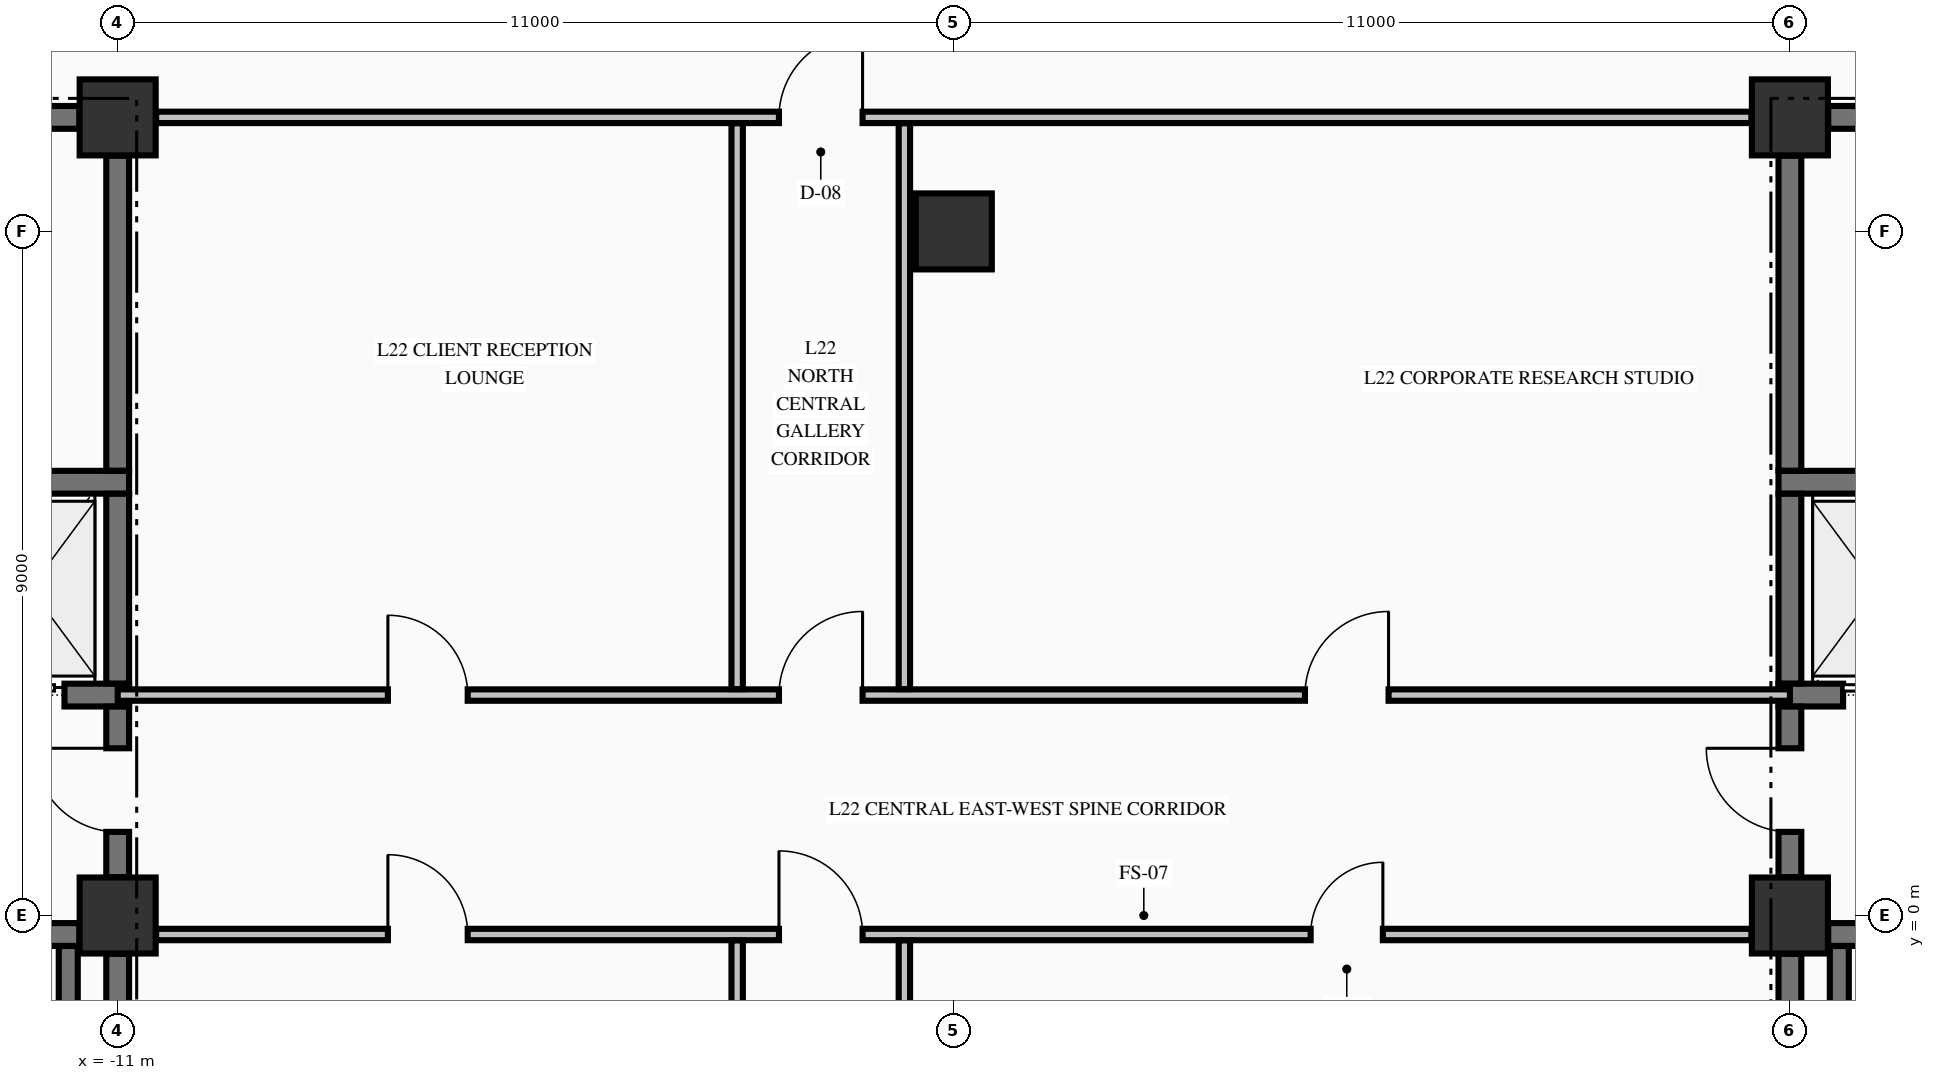
"""IFC4 building model, lengths in metres.
Left out: names, types, materials, properties, quantities, classifications, styles, units other than length and angle.
Written with IfcOpenShell. Run it as: python <this file> out.ifc"""

import sys

from ifc_helpers import new_model, si_unit, direction, frame, frame_2d, origin, origin_2d, place, context, subcontext, project, spatial, rectangle, extrude, element, fill, save


model = new_model("IFC4")
c1 = context("Model", 3, precision=1e-05, world=origin(), true_north=direction((0.0, 1.0)))
c2 = subcontext(c1, "Body", "Model", "MODEL_VIEW")
j1 = project(units=[si_unit("LENGTHUNIT", "METRE"), si_unit("PLANEANGLEUNIT", "RADIAN")], contexts=[c1])
p1 = place(None, origin())
s1 = spatial("IfcSite", under=j1, at=p1, CompositionType="ELEMENT")
p2 = place(p1, origin())
s2 = spatial("IfcBuilding", under=s1, at=p2, CompositionType="ELEMENT")
p3 = place(p2, frame((0.0, 0.0, 91.36)))
s3 = spatial("IfcBuildingStorey", under=s2, at=p3, CompositionType="ELEMENT", Elevation=91.36)
for number, where, z_axis, x_axis in (
    (1, (-11.0, 0.0, -0.25), (0.0, 0.0, 1.0), (1.0, 0.0, 0.0)),
    (2, (-11.0, 10.5, -0.25), (0.0, 0.0, 1.0), (1.0, 0.0, 0.0)),
    (3, (11.0, 0.0, -0.25), (0.0, 0.0, 1.0), (1.0, 0.0, 0.0)),
    (4, (11.0, 10.5, -0.25), (0.0, 0.0, 1.0), (1.0, 0.0, 0.0)),
    (5, (0.0, 9.0, -0.25), (0.0, 0.0, 1.0), (1.0, 0.0, 0.0)),
):
    element("IfcColumn", number, at=place(p3, frame(where, z_axis=z_axis, x_axis=x_axis)), inside=s3, PredefinedType="COLUMN", context=c2, shape_type="SweptSolid", body=[
        extrude(rectangle(XDim=1.0, YDim=1.0, at=origin_2d()), origin(), (0.0, 0.0, 1.0), 3.57),
    ])
p4 = place(p3, frame((-19.496, -0.25, 0.0), z_axis=(0.0, 0.0, 1.0), x_axis=(1.0, 0.0, 0.0)))
e6 = element("IfcWall", 6, at=p4, inside=s3, PredefinedType="SHEAR", context=c2, shape_type="SweptSolid", body=[
    extrude(rectangle(XDim=7.992, YDim=0.3, at=frame_2d((3.996, 0.0))), origin(), (0.0, 0.0, 1.0), 3.32),
])
p5 = place(p4, frame((5.796, 0.0, 0.0)))
e7 = element("IfcOpeningElement", 7, at=p5, cuts=e6, PredefinedType="OPENING", context=c2, shape_type="SweptSolid", body=[
    extrude(rectangle(XDim=1.1, YDim=2.15, at=frame_2d((0.55, 1.075))), frame((0.0, 0.16, 0.0), z_axis=(0.0, -1.0, 0.0), x_axis=(1.0, 0.0, 0.0)), (0.0, 0.0, 1.0), 0.32),
])
p6 = place(p3, frame((11.504, -0.25, 0.0), z_axis=(0.0, 0.0, 1.0), x_axis=(1.0, 0.0, 0.0)))
e8 = element("IfcWall", 8, at=p6, inside=s3, PredefinedType="SHEAR", context=c2, shape_type="SweptSolid", body=[
    extrude(rectangle(XDim=3.371, YDim=0.3, at=frame_2d((1.686, 0.0))), origin(), (0.0, 0.0, 1.0), 3.32),
])
p7 = place(p6, frame((1.096, 0.0, 0.0)))
e9 = element("IfcOpeningElement", 9, at=p7, cuts=e8, PredefinedType="OPENING", context=c2, shape_type="SweptSolid", body=[
    extrude(rectangle(XDim=1.1, YDim=2.15, at=frame_2d((0.55, 1.075))), frame((0.0, 0.16, 0.0), z_axis=(0.0, -1.0, 0.0), x_axis=(1.0, 0.0, 0.0)), (0.0, 0.0, 1.0), 0.32),
])
p8 = place(p3, frame((-14.875, 2.9, 0.0), z_axis=(0.0, 0.0, 1.0), x_axis=(1.0, 0.0, 0.0)))
e10 = element("IfcWall", 10, at=p8, inside=s3, PredefinedType="SHEAR", context=c2, shape_type="SweptSolid", body=[
    extrude(rectangle(XDim=4.025, YDim=0.3, at=frame_2d((2.012, 0.0))), origin(), (0.0, 0.0, 1.0), 3.32),
])
p9 = place(p8, frame((2.075, 0.0, 0.0)))
e11 = element("IfcOpeningElement", 11, at=p9, cuts=e10, PredefinedType="OPENING", context=c2, shape_type="SweptSolid", body=[
    extrude(rectangle(XDim=1.1, YDim=2.2, at=frame_2d((0.55, 1.1))), frame((0.0, 0.16, 0.0), z_axis=(0.0, -1.0, 0.0), x_axis=(1.0, 0.0, 0.0)), (0.0, 0.0, 1.0), 0.32),
])
p10 = place(p3, frame((10.85, 2.9, 0.0), z_axis=(0.0, 0.0, 1.0), x_axis=(1.0, 0.0, 0.0)))
e12 = element("IfcWall", 12, at=p10, inside=s3, PredefinedType="SHEAR", context=c2, shape_type="SweptSolid", body=[
    extrude(rectangle(XDim=4.025, YDim=0.3, at=frame_2d((2.012, 0.0))), origin(), (0.0, 0.0, 1.0), 3.32),
])
p11 = place(p10, frame((0.85, 0.0, 0.0)))
e13 = element("IfcOpeningElement", 13, at=p11, cuts=e12, PredefinedType="OPENING", context=c2, shape_type="SweptSolid", body=[
    extrude(rectangle(XDim=1.1, YDim=2.2, at=frame_2d((0.55, 1.1))), frame((0.0, 0.16, 0.0), z_axis=(0.0, -1.0, 0.0), x_axis=(1.0, 0.0, 0.0)), (0.0, 0.0, 1.0), 0.32),
])
for number, where, z_axis, x_axis in (
    (14, (-14.875, 5.7, 0.0), (0.0, 0.0, 1.0), (1.0, 0.0, 0.0)),
    (15, (10.85, 5.7, 0.0), (0.0, 0.0, 1.0), (1.0, 0.0, 0.0)),
):
    element("IfcWall", number, at=place(p3, frame(where, z_axis=z_axis, x_axis=x_axis)), inside=s3, PredefinedType="SHEAR", context=c2, shape_type="SweptSolid", body=[
        extrude(rectangle(XDim=4.025, YDim=0.3, at=frame_2d((2.012, 0.0))), origin(), (0.0, 0.0, 1.0), 3.32),
    ])
p12 = place(p3, frame((-14.7, 10.5, 0.0), z_axis=(0.0, 0.0, 1.0), x_axis=(1.0, 0.0, 0.0)))
e16 = element("IfcWall", 16, at=p12, inside=s3, PredefinedType="SHEAR", context=c2, shape_type="SweptSolid", body=[
    extrude(rectangle(XDim=3.196, YDim=0.3, at=frame_2d((1.598, 0.0))), origin(), (0.0, 0.0, 1.0), 3.32),
])
p13 = place(p12, frame((0.775, 0.0, 0.0)))
e17 = element("IfcOpeningElement", 17, at=p13, cuts=e16, PredefinedType="OPENING", context=c2, shape_type="SweptSolid", body=[
    extrude(rectangle(XDim=0.95, YDim=2.15, at=frame_2d((0.475, 1.075))), frame((0.0, 0.16, 0.0), z_axis=(0.0, -1.0, 0.0), x_axis=(1.0, 0.0, 0.0)), (0.0, 0.0, 1.0), 0.32),
])
p14 = place(p3, frame((11.504, 10.5, 0.0), z_axis=(0.0, 0.0, 1.0), x_axis=(1.0, 0.0, 0.0)))
e18 = element("IfcWall", 18, at=p14, inside=s3, PredefinedType="SHEAR", context=c2, shape_type="SweptSolid", body=[
    extrude(rectangle(XDim=3.196, YDim=0.3, at=frame_2d((1.598, 0.0))), origin(), (0.0, 0.0, 1.0), 3.32),
])
p15 = place(p14, frame((1.471, 0.0, 0.0)))
e19 = element("IfcOpeningElement", 19, at=p15, cuts=e18, PredefinedType="OPENING", context=c2, shape_type="SweptSolid", body=[
    extrude(rectangle(XDim=0.95, YDim=2.15, at=frame_2d((0.475, 1.075))), frame((0.0, 0.16, 0.0), z_axis=(0.0, -1.0, 0.0), x_axis=(1.0, 0.0, 0.0)), (0.0, 0.0, 1.0), 0.32),
])
p16 = place(p3, frame((-10.494, -0.25, 0.0), z_axis=(0.0, 0.0, 1.0), x_axis=(1.0, 0.0, 0.0)))
e20 = element("IfcWall", 20, at=p16, inside=s3, PredefinedType="PARTITIONING", context=c2, shape_type="SweptSolid", body=[
    extrude(rectangle(XDim=20.988, YDim=0.15, at=frame_2d((10.494, 0.0))), origin(), (0.0, 0.0, 1.0), 3.32),
])
p17 = place(p16, frame((8.194, 0.0, 0.0)))
e21 = element("IfcOpeningElement", 21, at=p17, cuts=e20, PredefinedType="OPENING", context=c2, shape_type="SweptSolid", body=[
    extrude(rectangle(XDim=1.1, YDim=2.15, at=frame_2d((0.55, 1.075))), frame((0.0, 0.085, 0.0), z_axis=(0.0, -1.0, 0.0), x_axis=(1.0, 0.0, 0.0)), (0.0, 0.0, 1.0), 0.17),
])
p18 = place(p16, frame((3.049, 0.0, 0.0)))
e22 = element("IfcOpeningElement", 22, at=p18, cuts=e20, PredefinedType="OPENING", context=c2, shape_type="SweptSolid", body=[
    extrude(rectangle(XDim=1.05, YDim=2.15, at=frame_2d((0.525, 1.075))), frame((0.0, 0.085, 0.0), z_axis=(0.0, -1.0, 0.0), x_axis=(1.0, 0.0, 0.0)), (0.0, 0.0, 1.0), 0.17),
])
p19 = place(p16, frame((15.189, 0.0, 0.0)))
e23 = element("IfcOpeningElement", 23, at=p19, cuts=e20, PredefinedType="OPENING", context=c2, shape_type="SweptSolid", body=[
    extrude(rectangle(XDim=0.95, YDim=2.15, at=frame_2d((0.475, 1.075))), frame((0.0, 0.085, 0.0), z_axis=(0.0, -1.0, 0.0), x_axis=(1.0, 0.0, 0.0)), (0.0, 0.0, 1.0), 0.17),
])
p20 = place(p3, frame((-11.0, 2.9, 0.0), z_axis=(0.0, 0.0, 1.0), x_axis=(1.0, 0.0, 0.0)))
e24 = element("IfcWall", 24, at=p20, inside=s3, PredefinedType="PARTITIONING", context=c2, shape_type="SweptSolid", body=[
    extrude(rectangle(XDim=22.0, YDim=0.15, at=frame_2d((11.0, 0.0))), origin(), (0.0, 0.0, 1.0), 3.32),
])
p21 = place(p20, frame((8.7, 0.0, 0.0)))
e25 = element("IfcOpeningElement", 25, at=p21, cuts=e24, PredefinedType="OPENING", context=c2, shape_type="SweptSolid", body=[
    extrude(rectangle(XDim=1.1, YDim=2.15, at=frame_2d((0.55, 1.075))), frame((0.0, 0.085, 0.0), z_axis=(0.0, -1.0, 0.0), x_axis=(1.0, 0.0, 0.0)), (0.0, 0.0, 1.0), 0.17),
])
p22 = place(p20, frame((3.555, 0.0, 0.0)))
e26 = element("IfcOpeningElement", 26, at=p22, cuts=e24, PredefinedType="OPENING", context=c2, shape_type="SweptSolid", body=[
    extrude(rectangle(XDim=1.05, YDim=2.15, at=frame_2d((0.525, 1.075))), frame((0.0, 0.085, 0.0), z_axis=(0.0, -1.0, 0.0), x_axis=(1.0, 0.0, 0.0)), (0.0, 0.0, 1.0), 0.17),
])
p23 = place(p20, frame((15.62, 0.0, 0.0)))
e27 = element("IfcOpeningElement", 27, at=p23, cuts=e24, PredefinedType="OPENING", context=c2, shape_type="SweptSolid", body=[
    extrude(rectangle(XDim=1.1, YDim=2.15, at=frame_2d((0.55, 1.075))), frame((0.0, 0.085, 0.0), z_axis=(0.0, -1.0, 0.0), x_axis=(1.0, 0.0, 0.0)), (0.0, 0.0, 1.0), 0.17),
])
p24 = place(p3, frame((-10.494, 10.5, 0.0), z_axis=(0.0, 0.0, 1.0), x_axis=(1.0, 0.0, 0.0)))
e28 = element("IfcWall", 28, at=p24, inside=s3, PredefinedType="PARTITIONING", context=c2, shape_type="SweptSolid", body=[
    extrude(rectangle(XDim=20.988, YDim=0.15, at=frame_2d((10.494, 0.0))), origin(), (0.0, 0.0, 1.0), 3.32),
])
p25 = place(p24, frame((8.194, 0.0, 0.0)))
e29 = element("IfcOpeningElement", 29, at=p25, cuts=e28, PredefinedType="OPENING", context=c2, shape_type="SweptSolid", body=[
    extrude(rectangle(XDim=1.1, YDim=2.15, at=frame_2d((0.55, 1.075))), frame((0.0, 0.085, 0.0), z_axis=(0.0, -1.0, 0.0), x_axis=(1.0, 0.0, 0.0)), (0.0, 0.0, 1.0), 0.17),
])
p26 = place(p3, frame((-11.65, -9.798, 0.0), z_axis=(0.0, 0.0, 1.0), x_axis=(0.0, 1.0, 0.0)))
e30 = element("IfcWall", 30, at=p26, inside=s3, PredefinedType="SOLIDWALL", context=c2, shape_type="SweptSolid", body=[
    extrude(rectangle(XDim=9.396, YDim=0.25, at=frame_2d((4.698, 0.0))), origin(), (0.0, 0.0, 1.0), 3.32),
])
p27 = place(p3, frame((-11.0, -9.446, 0.0), z_axis=(0.0, 0.0, 1.0), x_axis=(0.0, 1.0, 0.0)))
e31 = element("IfcWall", 31, at=p27, inside=s3, PredefinedType="SHEAR", context=c2, shape_type="SweptSolid", body=[
    extrude(rectangle(XDim=8.942, YDim=0.3, at=frame_2d((4.471, 0.0))), origin(), (0.0, 0.0, 1.0), 3.32),
])
p28 = place(p3, frame((-11.0, 0.504, 0.0), z_axis=(0.0, 0.0, 1.0), x_axis=(0.0, 1.0, 0.0)))
e32 = element("IfcWall", 32, at=p28, inside=s3, PredefinedType="SHEAR", context=c2, shape_type="SweptSolid", body=[
    extrude(rectangle(XDim=2.244, YDim=0.3, at=frame_2d((1.122, 0.0))), origin(), (0.0, 0.0, 1.0), 3.32),
])
p29 = place(p28, frame((0.596, 0.0, 0.0)))
e33 = element("IfcOpeningElement", 33, at=p29, cuts=e32, PredefinedType="OPENING", context=c2, shape_type="SweptSolid", body=[
    extrude(rectangle(XDim=1.1, YDim=2.15, at=frame_2d((0.55, 1.075))), frame((0.0, 0.16, 0.0), z_axis=(0.0, -1.0, 0.0), x_axis=(1.0, 0.0, 0.0)), (0.0, 0.0, 1.0), 0.32),
])
p30 = place(p3, frame((-11.0, 3.052, 0.0), z_axis=(0.0, 0.0, 1.0), x_axis=(0.0, 1.0, 0.0)))
e34 = element("IfcWall", 34, at=p30, inside=s3, PredefinedType="SHEAR", context=c2, shape_type="SweptSolid", body=[
    extrude(rectangle(XDim=2.496, YDim=0.3, at=frame_2d((1.248, 0.0))), origin(), (0.0, 0.0, 1.0), 3.32),
])
p31 = place(p3, frame((-11.0, 5.852, 0.0), z_axis=(0.0, 0.0, 1.0), x_axis=(0.0, 1.0, 0.0)))
e35 = element("IfcWall", 35, at=p31, inside=s3, PredefinedType="SHEAR", context=c2, shape_type="SweptSolid", body=[
    extrude(rectangle(XDim=4.144, YDim=0.3, at=frame_2d((2.072, 0.0))), origin(), (0.0, 0.0, 1.0), 3.32),
])
p32 = place(p3, frame((11.0, -9.446, 0.0), z_axis=(0.0, 0.0, 1.0), x_axis=(0.0, 1.0, 0.0)))
e36 = element("IfcWall", 36, at=p32, inside=s3, PredefinedType="SHEAR", context=c2, shape_type="SweptSolid", body=[
    extrude(rectangle(XDim=8.942, YDim=0.3, at=frame_2d((4.471, 0.0))), origin(), (0.0, 0.0, 1.0), 3.32),
])
p33 = place(p3, frame((11.0, 0.504, 0.0), z_axis=(0.0, 0.0, 1.0), x_axis=(0.0, 1.0, 0.0)))
e37 = element("IfcWall", 37, at=p33, inside=s3, PredefinedType="SHEAR", context=c2, shape_type="SweptSolid", body=[
    extrude(rectangle(XDim=2.244, YDim=0.3, at=frame_2d((1.122, 0.0))), origin(), (0.0, 0.0, 1.0), 3.32),
])
p34 = place(p33, frame((0.596, 0.0, 0.0)))
e38 = element("IfcOpeningElement", 38, at=p34, cuts=e37, PredefinedType="OPENING", context=c2, shape_type="SweptSolid", body=[
    extrude(rectangle(XDim=1.1, YDim=2.15, at=frame_2d((0.55, 1.075))), frame((0.0, 0.16, 0.0), z_axis=(0.0, -1.0, 0.0), x_axis=(1.0, 0.0, 0.0)), (0.0, 0.0, 1.0), 0.32),
])
p35 = place(p3, frame((11.0, 3.052, 0.0), z_axis=(0.0, 0.0, 1.0), x_axis=(0.0, 1.0, 0.0)))
e39 = element("IfcWall", 39, at=p35, inside=s3, PredefinedType="SHEAR", context=c2, shape_type="SweptSolid", body=[
    extrude(rectangle(XDim=2.496, YDim=0.3, at=frame_2d((1.248, 0.0))), origin(), (0.0, 0.0, 1.0), 3.32),
])
p36 = place(p3, frame((11.0, 5.852, 0.0), z_axis=(0.0, 0.0, 1.0), x_axis=(0.0, 1.0, 0.0)))
e40 = element("IfcWall", 40, at=p36, inside=s3, PredefinedType="SHEAR", context=c2, shape_type="SweptSolid", body=[
    extrude(rectangle(XDim=4.144, YDim=0.3, at=frame_2d((2.072, 0.0))), origin(), (0.0, 0.0, 1.0), 3.32),
])
p37 = place(p3, frame((11.65, -9.798, 0.0), z_axis=(0.0, 0.0, 1.0), x_axis=(0.0, 1.0, 0.0)))
e41 = element("IfcWall", 41, at=p37, inside=s3, PredefinedType="SOLIDWALL", context=c2, shape_type="SweptSolid", body=[
    extrude(rectangle(XDim=9.396, YDim=0.25, at=frame_2d((4.698, 0.0))), origin(), (0.0, 0.0, 1.0), 3.32),
])
p38 = place(p3, frame((-2.85, -9.872, 0.0), z_axis=(0.0, 0.0, 1.0), x_axis=(0.0, 1.0, 0.0)))
e42 = element("IfcWall", 42, at=p38, inside=s3, PredefinedType="PARTITIONING", context=c2, shape_type="SweptSolid", body=[
    extrude(rectangle(XDim=9.544, YDim=0.15, at=frame_2d((4.772, 0.0))), origin(), (0.0, 0.0, 1.0), 3.32),
])
p39 = place(p3, frame((-2.85, 2.978, 0.0), z_axis=(0.0, 0.0, 1.0), x_axis=(0.0, 1.0, 0.0)))
e43 = element("IfcWall", 43, at=p39, inside=s3, PredefinedType="PARTITIONING", context=c2, shape_type="SweptSolid", body=[
    extrude(rectangle(XDim=7.444, YDim=0.15, at=frame_2d((3.722, 0.0))), origin(), (0.0, 0.0, 1.0), 3.32),
])
p40 = place(p3, frame((-0.65, -5.247, 0.0), z_axis=(0.0, 0.0, 1.0), x_axis=(0.0, 1.0, 0.0)))
e44 = element("IfcWall", 44, at=p40, inside=s3, PredefinedType="PARTITIONING", context=c2, shape_type="SweptSolid", body=[
    extrude(rectangle(XDim=4.919, YDim=0.15, at=frame_2d((2.459, 0.0))), origin(), (0.0, 0.0, 1.0), 3.32),
])
p41 = place(p3, frame((-0.65, 2.978, 0.0), z_axis=(0.0, 0.0, 1.0), x_axis=(0.0, 1.0, 0.0)))
e45 = element("IfcWall", 45, at=p41, inside=s3, PredefinedType="PARTITIONING", context=c2, shape_type="SweptSolid", body=[
    extrude(rectangle(XDim=7.444, YDim=0.15, at=frame_2d((3.722, 0.0))), origin(), (0.0, 0.0, 1.0), 3.32),
])
p42 = place(p29, origin())
e46 = element("IfcDoor", 46, at=p42, inside=s3, OperationType="SINGLE_SWING_RIGHT", PredefinedType="DOOR", context=c2, shape_type="SweptSolid", body=[
    extrude(rectangle(XDim=1.1, YDim=2.15, at=frame_2d((0.55, 1.075))), frame((0.0, 0.025, 0.0), z_axis=(0.0, -1.0, 0.0), x_axis=(1.0, 0.0, 0.0)), (0.0, 0.0, 1.0), 0.05),
])
fill(e33, e46)
p43 = place(p9, origin())
e47 = element("IfcDoor", 47, at=p43, inside=s3, OperationType="SLIDING_TO_LEFT", PredefinedType="DOOR", context=c2, shape_type="SweptSolid", body=[
    extrude(rectangle(XDim=1.1, YDim=2.2, at=frame_2d((0.55, 1.1))), frame((0.0, 0.025, 0.0), z_axis=(0.0, -1.0, 0.0), x_axis=(1.0, 0.0, 0.0)), (0.0, 0.0, 1.0), 0.05),
])
fill(e11, e47)
p44 = place(p34, origin())
e48 = element("IfcDoor", 48, at=p44, inside=s3, OperationType="SINGLE_SWING_RIGHT", PredefinedType="DOOR", context=c2, shape_type="SweptSolid", body=[
    extrude(rectangle(XDim=1.1, YDim=2.15, at=frame_2d((0.55, 1.075))), frame((0.0, 0.025, 0.0), z_axis=(0.0, -1.0, 0.0), x_axis=(1.0, 0.0, 0.0)), (0.0, 0.0, 1.0), 0.05),
])
fill(e38, e48)
p45 = place(p11, origin())
e49 = element("IfcDoor", 49, at=p45, inside=s3, OperationType="SLIDING_TO_RIGHT", PredefinedType="DOOR", context=c2, shape_type="SweptSolid", body=[
    extrude(rectangle(XDim=1.1, YDim=2.2, at=frame_2d((0.55, 1.1))), frame((0.0, 0.025, 0.0), z_axis=(0.0, -1.0, 0.0), x_axis=(1.0, 0.0, 0.0)), (0.0, 0.0, 1.0), 0.05),
])
fill(e13, e49)
p46 = place(p25, origin())
e50 = element("IfcDoor", 50, at=p46, inside=s3, OperationType="SINGLE_SWING_RIGHT", PredefinedType="DOOR", context=c2, shape_type="SweptSolid", body=[
    extrude(rectangle(XDim=1.1, YDim=2.15, at=frame_2d((0.55, 1.075))), frame((0.0, 0.025, 0.0), z_axis=(0.0, -1.0, 0.0), x_axis=(1.0, 0.0, 0.0)), (0.0, 0.0, 1.0), 0.05),
])
fill(e29, e50)
p47 = place(p21, origin())
e51 = element("IfcDoor", 51, at=p47, inside=s3, OperationType="SINGLE_SWING_RIGHT", PredefinedType="DOOR", context=c2, shape_type="SweptSolid", body=[
    extrude(rectangle(XDim=1.1, YDim=2.15, at=frame_2d((0.55, 1.075))), frame((0.0, 0.025, 0.0), z_axis=(0.0, -1.0, 0.0), x_axis=(1.0, 0.0, 0.0)), (0.0, 0.0, 1.0), 0.05),
])
fill(e25, e51)
p48 = place(p17, origin())
e52 = element("IfcDoor", 52, at=p48, inside=s3, OperationType="SINGLE_SWING_LEFT", PredefinedType="DOOR", context=c2, shape_type="SweptSolid", body=[
    extrude(rectangle(XDim=1.1, YDim=2.15, at=frame_2d((0.55, 1.075))), frame((0.0, 0.025, 0.0), z_axis=(0.0, -1.0, 0.0), x_axis=(1.0, 0.0, 0.0)), (0.0, 0.0, 1.0), 0.05),
])
fill(e21, e52)
p49 = place(p22, origin())
e53 = element("IfcDoor", 53, at=p49, inside=s3, OperationType="SINGLE_SWING_LEFT", PredefinedType="DOOR", context=c2, shape_type="SweptSolid", body=[
    extrude(rectangle(XDim=1.05, YDim=2.15, at=frame_2d((0.525, 1.075))), frame((0.0, 0.025, 0.0), z_axis=(0.0, -1.0, 0.0), x_axis=(1.0, 0.0, 0.0)), (0.0, 0.0, 1.0), 0.05),
])
fill(e26, e53)
p50 = place(p23, origin())
e54 = element("IfcDoor", 54, at=p50, inside=s3, OperationType="SINGLE_SWING_RIGHT", PredefinedType="DOOR", context=c2, shape_type="SweptSolid", body=[
    extrude(rectangle(XDim=1.1, YDim=2.15, at=frame_2d((0.55, 1.075))), frame((0.0, 0.025, 0.0), z_axis=(0.0, -1.0, 0.0), x_axis=(1.0, 0.0, 0.0)), (0.0, 0.0, 1.0), 0.05),
])
fill(e27, e54)
p51 = place(p18, origin())
e55 = element("IfcDoor", 55, at=p51, inside=s3, OperationType="SINGLE_SWING_LEFT", PredefinedType="DOOR", context=c2, shape_type="SweptSolid", body=[
    extrude(rectangle(XDim=1.05, YDim=2.15, at=frame_2d((0.525, 1.075))), frame((0.0, 0.025, 0.0), z_axis=(0.0, -1.0, 0.0), x_axis=(1.0, 0.0, 0.0)), (0.0, 0.0, 1.0), 0.05),
])
fill(e22, e55)
p52 = place(p19, origin())
e56 = element("IfcDoor", 56, at=p52, inside=s3, OperationType="SINGLE_SWING_RIGHT", PredefinedType="DOOR", context=c2, shape_type="SweptSolid", body=[
    extrude(rectangle(XDim=0.95, YDim=2.15, at=frame_2d((0.475, 1.075))), frame((0.0, 0.025, 0.0), z_axis=(0.0, -1.0, 0.0), x_axis=(1.0, 0.0, 0.0)), (0.0, 0.0, 1.0), 0.05),
])
fill(e23, e56)
save(model, sys.argv[1])
